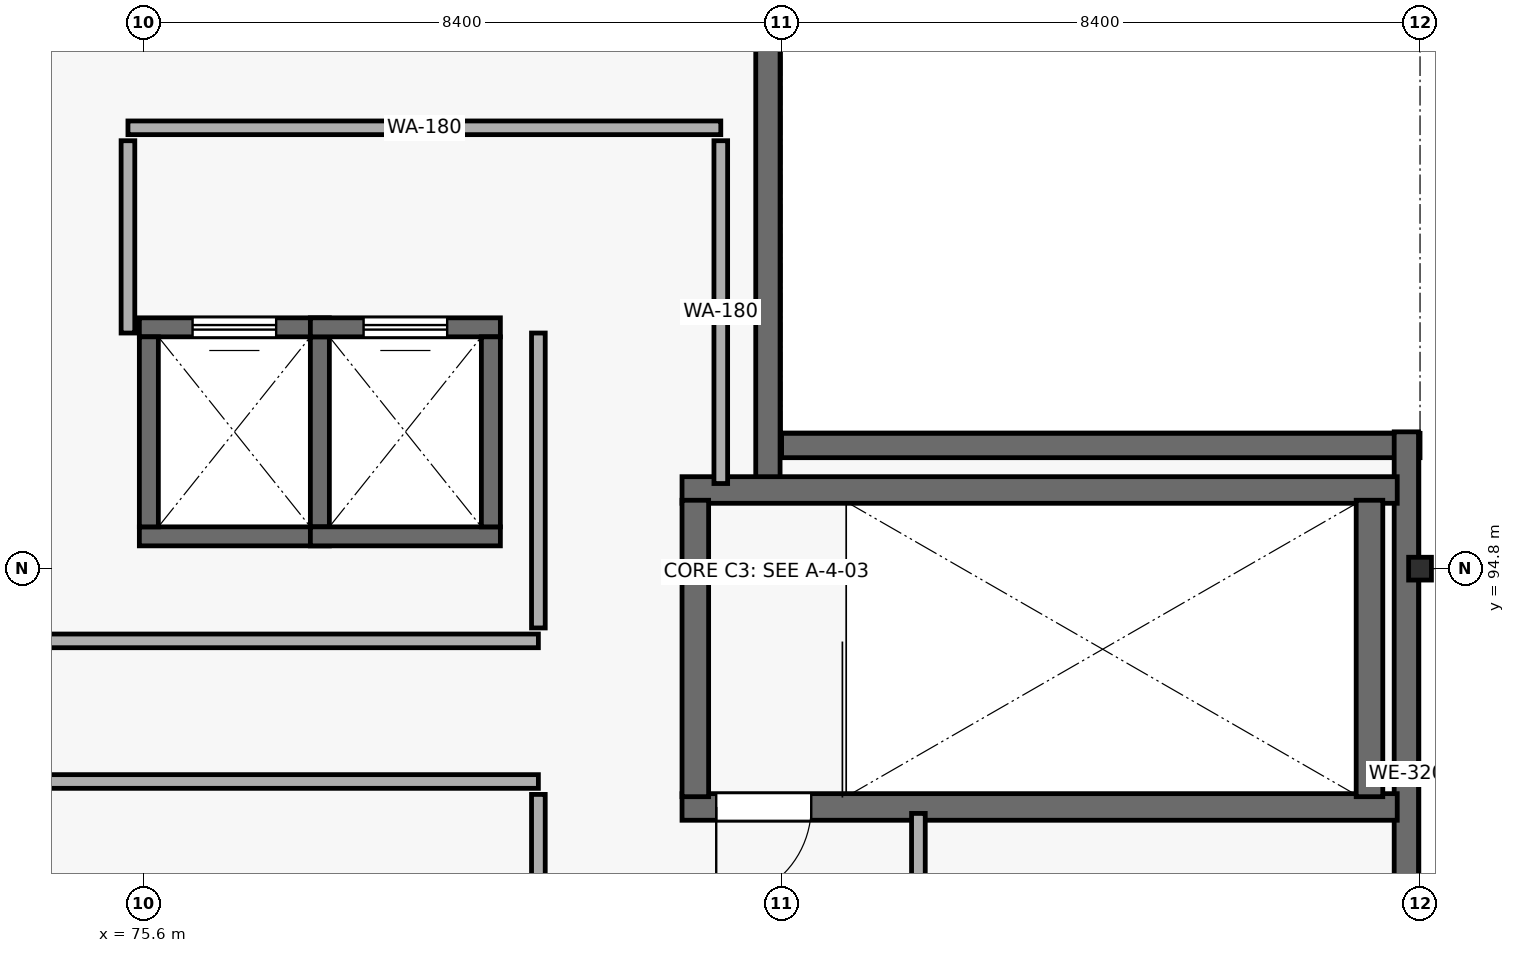
"""IFC4 building model, lengths in metres.
Left out: names, types, materials, properties, quantities, classifications, styles, units other than length and angle.
Written with IfcOpenShell. Run it as: python <this file> out.ifc"""

import sys

from ifc_helpers import new_model, si_unit, direction, frame, frame_2d, origin, origin_2d, place, context, subcontext, project, spatial, rectangle, hollow_rectangle, extrude, element, fill, save


model = new_model("IFC4")
c1 = context("Model", 3, precision=1e-05, world=origin(), true_north=direction((0.0, 1.0)))
c2 = subcontext(c1, "Body", "Model", "MODEL_VIEW")
j1 = project(units=[si_unit("LENGTHUNIT", "METRE"), si_unit("PLANEANGLEUNIT", "RADIAN")], contexts=[c1])
p1 = place(None, origin())
s1 = spatial("IfcSite", under=j1, at=p1, CompositionType="ELEMENT")
p2 = place(p1, origin())
s2 = spatial("IfcBuilding", under=s1, at=p2, CompositionType="ELEMENT")
p3 = place(p2, frame((0.0, 0.0, 35.7)))
s3 = spatial("IfcBuildingStorey", under=s2, at=p3, CompositionType="ELEMENT", Elevation=35.7)
p4 = place(p3, frame((92.4, 94.8, 0.0), z_axis=(0.0, 0.0, 1.0), x_axis=(1.0, 0.0, 0.0)))
e1 = element("IfcColumn", 1, at=p4, inside=s3, PredefinedType="COLUMN", context=c2, shape_type="SweptSolid", body=[
    extrude(hollow_rectangle(XDim=0.3, YDim=0.3, WallThickness=0.012, at=origin_2d()), origin(), (0.0, 0.0, 1.0), 4.5),
])
p5 = place(p3, frame((83.82, 110.4, 0.0), z_axis=(0.0, 0.0, 1.0), x_axis=(0.0, -1.0, 0.0)))
e2 = element("IfcWall", 2, at=p5, inside=s3, PredefinedType="SOLIDWALL", context=c2, shape_type="SweptSolid", body=[
    extrude(rectangle(XDim=14.43, YDim=0.32, at=frame_2d((7.215, 0.0))), origin(), (0.0, 0.0, 1.0), 4.08),
])
p6 = place(p5, frame((5.04, 0.0, 0.75)))
e3 = element("IfcOpeningElement", 3, at=p6, cuts=e2, PredefinedType="OPENING", context=c2, shape_type="SweptSolid", body=[
    extrude(rectangle(XDim=1.12, YDim=2.25, at=frame_2d((0.56, 1.125))), frame((0.0, 0.17, 0.0), z_axis=(0.0, -1.0, 0.0), x_axis=(1.0, 0.0, 0.0)), (0.0, 0.0, 1.0), 0.34),
])
p7 = place(p3, frame((84.0, 96.42, 0.0), z_axis=(0.0, 0.0, 1.0), x_axis=(1.0, 0.0, 0.0)))
e4 = element("IfcWall", 4, at=p7, inside=s3, PredefinedType="SOLIDWALL", context=c2, shape_type="SweptSolid", body=[
    extrude(rectangle(XDim=8.4, YDim=0.32, at=frame_2d((4.2, 0.0))), origin(), (0.0, 0.0, 1.0), 4.08),
])
p8 = place(p3, frame((92.22, 96.6, 0.0), z_axis=(0.0, 0.0, 1.0), x_axis=(0.0, -1.0, 0.0)))
e5 = element("IfcWall", 5, at=p8, inside=s3, PredefinedType="SOLIDWALL", context=c2, shape_type="SweptSolid", body=[
    extrude(rectangle(XDim=9.0, YDim=0.32, at=frame_2d((4.5, 0.0))), origin(), (0.0, 0.0, 1.0), 4.08),
])
p9 = place(p3, frame((82.69, 91.665, 0.0), z_axis=(0.0, 0.0, 1.0), x_axis=(1.0, 0.0, 0.0)))
e6 = element("IfcWall", 6, at=p9, inside=s3, PredefinedType="SHEAR", context=c2, shape_type="SweptSolid", body=[
    extrude(rectangle(XDim=9.41, YDim=0.35, at=frame_2d((4.705, 0.0))), origin(), (0.0, 0.0, 1.0), 4.24),
])
p10 = place(p9, frame((0.45, 0.0, 0.0)))
e7 = element("IfcOpeningElement", 7, at=p10, cuts=e6, PredefinedType="OPENING", context=c2, shape_type="SweptSolid", body=[
    extrude(rectangle(XDim=1.25, YDim=2.2, at=frame_2d((0.625, 1.1))), frame((0.0, 0.185, 0.0), z_axis=(0.0, -1.0, 0.0), x_axis=(1.0, 0.0, 0.0)), (0.0, 0.0, 1.0), 0.37),
])
p11 = place(p3, frame((92.1, 95.835, 0.0), z_axis=(0.0, 0.0, 1.0), x_axis=(-1.0, 0.0, 0.0)))
e8 = element("IfcWall", 8, at=p11, inside=s3, PredefinedType="SHEAR", context=c2, shape_type="SweptSolid", body=[
    extrude(rectangle(XDim=9.41, YDim=0.35, at=frame_2d((4.705, 0.0))), origin(), (0.0, 0.0, 1.0), 4.24),
])
for number, where, z_axis, x_axis in (
    (9, (82.865, 91.8, 0.0), (0.0, 0.0, 1.0), (0.0, 1.0, 0.0)),
    (10, (91.735, 95.7, 0.0), (0.0, 0.0, 1.0), (0.0, -1.0, 0.0)),
):
    element("IfcWall", number, at=place(p3, frame(where, z_axis=z_axis, x_axis=x_axis)), inside=s3, PredefinedType="SHEAR", context=c2, shape_type="SweptSolid", body=[
        extrude(rectangle(XDim=3.9, YDim=0.35, at=frame_2d((1.95, 0.0))), origin(), (0.0, 0.0, 1.0), 4.24),
    ])
p12 = place(p3, frame((75.55, 95.225, 0.0), z_axis=(0.0, 0.0, 1.0), x_axis=(1.0, 0.0, 0.0)))
e11 = element("IfcWall", 11, at=p12, inside=s3, PredefinedType="SHEAR", context=c2, shape_type="SweptSolid", body=[
    extrude(rectangle(XDim=2.5, YDim=0.25, at=frame_2d((1.25, 0.0))), origin(), (0.0, 0.0, 1.0), 4.24),
])
p13 = place(p3, frame((78.05, 97.975, 0.0), z_axis=(0.0, 0.0, 1.0), x_axis=(-1.0, 0.0, 0.0)))
e12 = element("IfcWall", 12, at=p13, inside=s3, PredefinedType="SHEAR", context=c2, shape_type="SweptSolid", body=[
    extrude(rectangle(XDim=2.5, YDim=0.25, at=frame_2d((1.25, 0.0))), origin(), (0.0, 0.0, 1.0), 4.24),
])
p14 = place(p13, frame((0.7, 0.0, 0.0)))
e13 = element("IfcOpeningElement", 13, at=p14, cuts=e12, PredefinedType="OPENING", context=c2, shape_type="SweptSolid", body=[
    extrude(rectangle(XDim=1.1, YDim=2.2, at=frame_2d((0.55, 1.1))), frame((0.0, 0.135, 0.0), z_axis=(0.0, -1.0, 0.0), x_axis=(1.0, 0.0, 0.0)), (0.0, 0.0, 1.0), 0.27),
])
for number, where, z_axis, x_axis in (
    (14, (75.675, 95.35, 0.0), (0.0, 0.0, 1.0), (0.0, 1.0, 0.0)),
    (15, (77.925, 97.85, 0.0), (0.0, 0.0, 1.0), (0.0, -1.0, 0.0)),
    (16, (77.8, 95.225, 0.0), (0.0, 0.0, 1.0), (1.0, 0.0, 0.0)),
):
    element("IfcWall", number, at=place(p3, frame(where, z_axis=z_axis, x_axis=x_axis)), inside=s3, PredefinedType="SHEAR", context=c2, shape_type="SweptSolid", body=[
        extrude(rectangle(XDim=2.5, YDim=0.25, at=frame_2d((1.25, 0.0))), origin(), (0.0, 0.0, 1.0), 4.24),
    ])
p15 = place(p3, frame((80.3, 97.975, 0.0), z_axis=(0.0, 0.0, 1.0), x_axis=(-1.0, 0.0, 0.0)))
e17 = element("IfcWall", 17, at=p15, inside=s3, PredefinedType="SHEAR", context=c2, shape_type="SweptSolid", body=[
    extrude(rectangle(XDim=2.5, YDim=0.25, at=frame_2d((1.25, 0.0))), origin(), (0.0, 0.0, 1.0), 4.24),
])
p16 = place(p15, frame((0.7, 0.0, 0.0)))
e18 = element("IfcOpeningElement", 18, at=p16, cuts=e17, PredefinedType="OPENING", context=c2, shape_type="SweptSolid", body=[
    extrude(rectangle(XDim=1.1, YDim=2.2, at=frame_2d((0.55, 1.1))), frame((0.0, 0.135, 0.0), z_axis=(0.0, -1.0, 0.0), x_axis=(1.0, 0.0, 0.0)), (0.0, 0.0, 1.0), 0.27),
])
p17 = place(p3, frame((80.175, 97.85, 0.0), z_axis=(0.0, 0.0, 1.0), x_axis=(0.0, -1.0, 0.0)))
e19 = element("IfcWall", 19, at=p17, inside=s3, PredefinedType="SHEAR", context=c2, shape_type="SweptSolid", body=[
    extrude(rectangle(XDim=2.5, YDim=0.25, at=frame_2d((1.25, 0.0))), origin(), (0.0, 0.0, 1.0), 4.24),
])
p18 = place(p3, frame((63.28, 92.0, 0.0), z_axis=(0.0, 0.0, 1.0), x_axis=(1.0, 0.0, 0.0)))
e20 = element("IfcWall", 20, at=p18, inside=s3, PredefinedType="PARTITIONING", context=c2, shape_type="SweptSolid", body=[
    extrude(rectangle(XDim=17.52, YDim=0.18, at=frame_2d((8.76, 0.0))), origin(), (0.0, 0.0, 1.0), 4.24),
])
p19 = place(p18, frame((1.578, 0.0, 0.0)))
e21 = element("IfcOpeningElement", 21, at=p19, cuts=e20, PredefinedType="OPENING", context=c2, shape_type="SweptSolid", body=[
    extrude(rectangle(XDim=2.1, YDim=2.65, at=frame_2d((1.05, 1.325))), frame((0.0, 0.1, 0.0), z_axis=(0.0, -1.0, 0.0), x_axis=(1.0, 0.0, 0.0)), (0.0, 0.0, 1.0), 0.2),
])
p20 = place(p3, frame((80.8, 93.85, 0.0), z_axis=(0.0, 0.0, 1.0), x_axis=(-1.0, 0.0, 0.0)))
e22 = element("IfcWall", 22, at=p20, inside=s3, PredefinedType="PARTITIONING", context=c2, shape_type="SweptSolid", body=[
    extrude(rectangle(XDim=14.13, YDim=0.18, at=frame_2d((7.065, 0.0))), origin(), (0.0, 0.0, 1.0), 4.24),
])
p21 = place(p3, frame((83.2, 100.6, 0.0), z_axis=(0.0, 0.0, 1.0), x_axis=(-1.0, 0.0, 0.0)))
e23 = element("IfcWall", 23, at=p21, inside=s3, PredefinedType="PARTITIONING", context=c2, shape_type="SweptSolid", body=[
    extrude(rectangle(XDim=7.8, YDim=0.18, at=frame_2d((3.9, 0.0))), origin(), (0.0, 0.0, 1.0), 4.24),
])
p22 = place(p3, frame((83.2, 95.92, 0.0), z_axis=(0.0, 0.0, 1.0), x_axis=(0.0, 1.0, 0.0)))
e24 = element("IfcWall", 24, at=p22, inside=s3, PredefinedType="PARTITIONING", context=c2, shape_type="SweptSolid", body=[
    extrude(rectangle(XDim=4.51, YDim=0.18, at=frame_2d((2.255, 0.0))), origin(), (0.0, 0.0, 1.0), 4.24),
])
p23 = place(p3, frame((80.8, 97.9, 0.0), z_axis=(0.0, 0.0, 1.0), x_axis=(0.0, -1.0, 0.0)))
e25 = element("IfcWall", 25, at=p23, inside=s3, PredefinedType="PARTITIONING", context=c2, shape_type="SweptSolid", body=[
    extrude(rectangle(XDim=3.88, YDim=0.18, at=frame_2d((1.94, 0.0))), origin(), (0.0, 0.0, 1.0), 4.24),
])
p24 = place(p3, frame((80.8, 91.83, 0.0), z_axis=(0.0, 0.0, 1.0), x_axis=(0.0, -1.0, 0.0)))
e26 = element("IfcWall", 26, at=p24, inside=s3, PredefinedType="PARTITIONING", context=c2, shape_type="SweptSolid", body=[
    extrude(rectangle(XDim=2.46, YDim=0.18, at=frame_2d((1.23, 0.0))), origin(), (0.0, 0.0, 1.0), 4.24),
])
p25 = place(p3, frame((75.4, 100.43, 0.0), z_axis=(0.0, 0.0, 1.0), x_axis=(0.0, -1.0, 0.0)))
e27 = element("IfcWall", 27, at=p25, inside=s3, PredefinedType="PARTITIONING", context=c2, shape_type="SweptSolid", body=[
    extrude(rectangle(XDim=2.53, YDim=0.18, at=frame_2d((1.265, 0.0))), origin(), (0.0, 0.0, 1.0), 2.85),
])
p26 = place(p3, frame((85.8, 89.37, 0.0), z_axis=(0.0, 0.0, 1.0), x_axis=(0.0, 1.0, 0.0)))
e28 = element("IfcWall", 28, at=p26, inside=s3, PredefinedType="PARTITIONING", context=c2, shape_type="SweptSolid", body=[
    extrude(rectangle(XDim=2.21, YDim=0.18, at=frame_2d((1.105, 0.0))), origin(), (0.0, 0.0, 1.0), 4.24),
])
p27 = place(p10, origin())
e29 = element("IfcDoor", 29, at=p27, inside=s3, OperationType="SINGLE_SWING_RIGHT", PredefinedType="DOOR", context=c2, shape_type="SweptSolid", body=[
    extrude(rectangle(XDim=1.25, YDim=2.2, at=frame_2d((0.625, 1.1))), frame((0.0, 0.025, 0.0), z_axis=(0.0, -1.0, 0.0), x_axis=(1.0, 0.0, 0.0)), (0.0, 0.0, 1.0), 0.05),
])
fill(e7, e29)
p28 = place(p14, origin())
e30 = element("IfcDoor", 30, at=p28, inside=s3, OperationType="SLIDING_TO_LEFT", PredefinedType="DOOR", context=c2, shape_type="SweptSolid", body=[
    extrude(rectangle(XDim=1.1, YDim=2.2, at=frame_2d((0.55, 1.1))), frame((0.0, 0.025, 0.0), z_axis=(0.0, -1.0, 0.0), x_axis=(1.0, 0.0, 0.0)), (0.0, 0.0, 1.0), 0.05),
])
fill(e13, e30)
p29 = place(p16, origin())
e31 = element("IfcDoor", 31, at=p29, inside=s3, OperationType="SLIDING_TO_LEFT", PredefinedType="DOOR", context=c2, shape_type="SweptSolid", body=[
    extrude(rectangle(XDim=1.1, YDim=2.2, at=frame_2d((0.55, 1.1))), frame((0.0, 0.025, 0.0), z_axis=(0.0, -1.0, 0.0), x_axis=(1.0, 0.0, 0.0)), (0.0, 0.0, 1.0), 0.05),
])
fill(e18, e31)
save(model, sys.argv[1])
